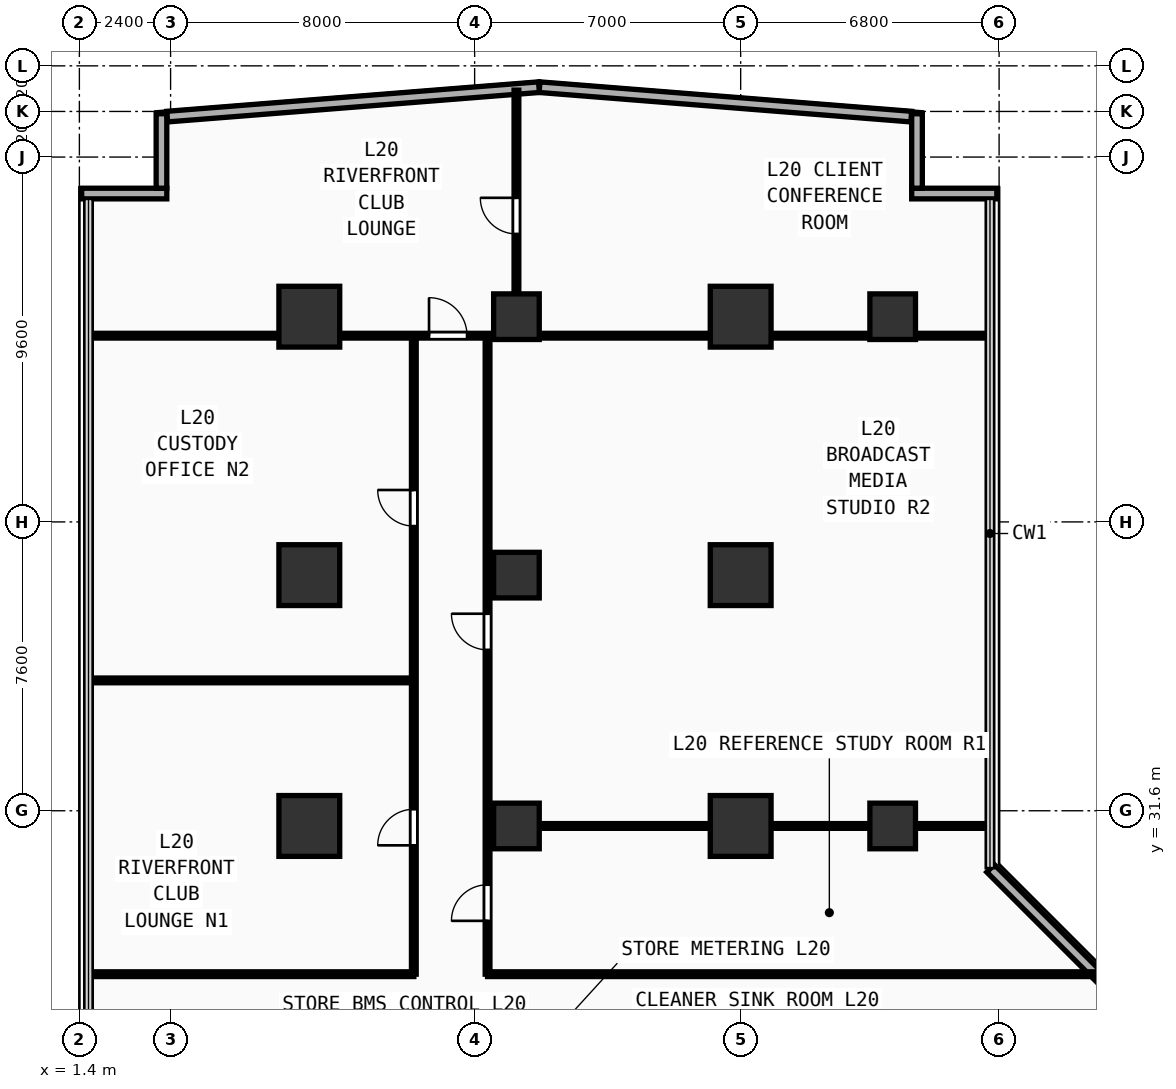
"""IFC4 building model, lengths in metres.
Left out: names, types, materials, properties, quantities, classifications, styles, units other than length and angle.
Written with IfcOpenShell. Run it as: python <this file> out.ifc"""

import sys

from ifc_helpers import new_model, si_unit, direction, frame, frame_2d, origin, origin_2d, place, context, subcontext, project, spatial, rectangle, extrude, element, fill, save


model = new_model("IFC4")
c1 = context("Model", 3, precision=1e-05, world=origin(), true_north=direction((0.0, 1.0)))
c2 = subcontext(c1, "Body", "Model", "MODEL_VIEW")
j1 = project(units=[si_unit("LENGTHUNIT", "METRE"), si_unit("PLANEANGLEUNIT", "RADIAN")], contexts=[c1])
p1 = place(None, origin())
s1 = spatial("IfcSite", under=j1, at=p1, CompositionType="ELEMENT")
p2 = place(p1, origin())
s2 = spatial("IfcBuilding", under=s1, at=p2, CompositionType="ELEMENT")
p3 = place(p2, frame((0.0, 0.0, 79.0)))
s3 = spatial("IfcBuildingStorey", under=s2, at=p3, CompositionType="ELEMENT", Elevation=79.0)
for number, where, z_axis, x_axis in (
    (1, (7.45, 31.2, 0.0), (0.0, 0.0, 1.0), (1.0, 0.0, 0.0)),
    (2, (7.45, 37.8, 0.0), (0.0, 0.0, 1.0), (1.0, 0.0, 0.0)),
    (3, (7.45, 44.6, 0.0), (0.0, 0.0, 1.0), (1.0, 0.0, 0.0)),
    (4, (18.8, 31.2, 0.0), (0.0, 0.0, 1.0), (1.0, 0.0, 0.0)),
    (5, (18.8, 37.8, 0.0), (0.0, 0.0, 1.0), (1.0, 0.0, 0.0)),
    (6, (18.8, 44.6, 0.0), (0.0, 0.0, 1.0), (1.0, 0.0, 0.0)),
):
    element("IfcColumn", number, at=place(p3, frame(where, z_axis=z_axis, x_axis=x_axis)), inside=s3, PredefinedType="COLUMN", context=c2, shape_type="SweptSolid", body=[
        extrude(rectangle(XDim=1.6, YDim=1.6, at=origin_2d()), origin(), (0.0, 0.0, 1.0), 3.42),
    ])
for number, where, z_axis, x_axis in (
    (7, (22.8, 31.2, 0.0), (0.0, 0.0, 1.0), (1.0, 0.0, 0.0)),
    (8, (22.8, 44.6, 0.0), (0.0, 0.0, 1.0), (1.0, 0.0, 0.0)),
    (9, (12.9, 31.2, 0.0), (0.0, 0.0, 1.0), (1.0, 0.0, 0.0)),
    (10, (12.9, 37.8, 0.0), (0.0, 0.0, 1.0), (1.0, 0.0, 0.0)),
    (11, (12.9, 44.6, 0.0), (0.0, 0.0, 1.0), (1.0, 0.0, 0.0)),
):
    element("IfcColumn", number, at=place(p3, frame(where, z_axis=z_axis, x_axis=x_axis)), inside=s3, PredefinedType="COLUMN", context=c2, shape_type="SweptSolid", body=[
        extrude(rectangle(XDim=1.2, YDim=1.2, at=origin_2d()), origin(), (0.0, 0.0, 1.0), 3.42),
    ])
p4 = place(p3, frame((23.3, 47.84, 0.0), z_axis=(0.0, 0.0, 1.0), x_axis=(1.0, 0.0, 0.0)))
e12 = element("IfcWall", 12, at=p4, inside=s3, PredefinedType="SOLIDWALL", context=c2, shape_type="SweptSolid", body=[
    extrude(rectangle(XDim=2.24, YDim=0.28, at=frame_2d((1.12, 0.0))), origin(), (0.0, 0.0, 1.0), 3.42),
])
p5 = place(p3, frame((23.44, 47.98, 0.0), z_axis=(0.0, 0.0, 1.0), x_axis=(0.0, 1.0, 0.0)))
e13 = element("IfcWall", 13, at=p5, inside=s3, PredefinedType="SOLIDWALL", context=c2, shape_type="SweptSolid", body=[
    extrude(rectangle(XDim=1.96, YDim=0.28, at=frame_2d((0.98, 0.0))), origin(), (0.0, 0.0, 1.0), 3.42),
])
p6 = place(p3, frame((1.46, 47.84, 0.0), z_axis=(0.0, 0.0, 1.0), x_axis=(1.0, 0.0, 0.0)))
e14 = element("IfcWall", 14, at=p6, inside=s3, PredefinedType="SOLIDWALL", context=c2, shape_type="SweptSolid", body=[
    extrude(rectangle(XDim=2.24, YDim=0.28, at=frame_2d((1.12, 0.0))), origin(), (0.0, 0.0, 1.0), 3.42),
])
p7 = place(p3, frame((3.56, 47.98, 0.0), z_axis=(0.0, 0.0, 1.0), x_axis=(0.0, 1.0, 0.0)))
e15 = element("IfcWall", 15, at=p7, inside=s3, PredefinedType="SOLIDWALL", context=c2, shape_type="SweptSolid", body=[
    extrude(rectangle(XDim=1.96, YDim=0.28, at=frame_2d((0.98, 0.0))), origin(), (0.0, 0.0, 1.0), 3.42),
])
p8 = place(p3, frame((31.885, 23.575, 0.0), z_axis=(0.0, 0.0, 1.0), x_axis=(-0.707106781187, 0.707106781187, 0.0)))
e16 = element("IfcWall", 16, at=p8, inside=s3, PredefinedType="SOLIDWALL", context=c2, shape_type="SweptSolid", body=[
    extrude(rectangle(XDim=9.207, YDim=0.28, at=frame_2d((4.603, 0.0))), origin(), (0.0, 0.0, 1.0), 3.42),
])
for number, where, z_axis, x_axis in (
    (17, (23.288, 49.864, 0.0), (0.0, 0.0, 1.0), (-0.997, 0.079, 0.0)),
    (18, (13.493, 50.639, 0.0), (0.0, 0.0, 1.0), (-0.997, -0.079, 0.0)),
):
    element("IfcWall", number, at=place(p3, frame(where, z_axis=z_axis, x_axis=x_axis)), inside=s3, PredefinedType="SOLIDWALL", context=c2, shape_type="SweptSolid", body=[
        extrude(rectangle(XDim=9.812, YDim=0.28, at=frame_2d((4.906, 0.0))), origin(), (0.0, 0.0, 1.0), 3.42),
    ])
p9 = place(p3, frame((1.64, 27.3, 0.0), z_axis=(0.0, 0.0, 1.0), x_axis=(1.0, 0.0, 0.0)))
e19 = element("IfcWall", 19, at=p9, inside=s3, PredefinedType="PARTITIONING", context=c2, shape_type="SweptSolid", body=[
    extrude(rectangle(XDim=8.56, YDim=0.125, at=frame_2d((4.28, 0.0))), origin(), (0.0, 0.0, 1.0), 3.42),
])
p10 = place(p3, frame((10.2, 27.3, 0.0), z_axis=(0.0, 0.0, 1.0), x_axis=(0.0, 1.0, 0.0)))
e20 = element("IfcWall", 20, at=p10, inside=s3, PredefinedType="PARTITIONING", context=c2, shape_type="SweptSolid", body=[
    extrude(rectangle(XDim=16.8, YDim=0.125, at=frame_2d((8.4, 0.0))), origin(), (0.0, 0.0, 1.0), 3.42),
])
p11 = place(p10, frame((3.39, 0.0, 0.0)))
e21 = element("IfcOpeningElement", 21, at=p11, cuts=e20, PredefinedType="OPENING", context=c2, shape_type="SweptSolid", body=[
    extrude(rectangle(XDim=0.95, YDim=2.15, at=frame_2d((0.475, 1.075))), frame((0.0, 0.073, 0.0), z_axis=(0.0, -1.0, 0.0), x_axis=(1.0, 0.0, 0.0)), (0.0, 0.0, 1.0), 0.145),
])
p12 = place(p10, frame((11.79, 0.0, 0.0)))
e22 = element("IfcOpeningElement", 22, at=p12, cuts=e20, PredefinedType="OPENING", context=c2, shape_type="SweptSolid", body=[
    extrude(rectangle(XDim=0.95, YDim=2.15, at=frame_2d((0.475, 1.075))), frame((0.0, 0.073, 0.0), z_axis=(0.0, -1.0, 0.0), x_axis=(1.0, 0.0, 0.0)), (0.0, 0.0, 1.0), 0.145),
])
p13 = place(p3, frame((1.64, 35.03, 0.0), z_axis=(0.0, 0.0, 1.0), x_axis=(1.0, 0.0, 0.0)))
e23 = element("IfcWall", 23, at=p13, inside=s3, PredefinedType="PARTITIONING", context=c2, shape_type="SweptSolid", body=[
    extrude(rectangle(XDim=8.56, YDim=0.125, at=frame_2d((4.28, 0.0))), origin(), (0.0, 0.0, 1.0), 3.42),
])
p14 = place(p3, frame((1.64, 44.1, 0.0), z_axis=(0.0, 0.0, 1.0), x_axis=(1.0, 0.0, 0.0)))
e24 = element("IfcWall", 24, at=p14, inside=s3, PredefinedType="PARTITIONING", context=c2, shape_type="SweptSolid", body=[
    extrude(rectangle(XDim=23.72, YDim=0.125, at=frame_2d((11.86, 0.0))), origin(), (0.0, 0.0, 1.0), 3.42),
])
p15 = place(p14, frame((8.96, 0.0, 0.0)))
e25 = element("IfcOpeningElement", 25, at=p15, cuts=e24, PredefinedType="OPENING", context=c2, shape_type="SweptSolid", body=[
    extrude(rectangle(XDim=1.0, YDim=2.2, at=frame_2d((0.5, 1.1))), frame((0.0, 0.073, 0.0), z_axis=(0.0, -1.0, 0.0), x_axis=(1.0, 0.0, 0.0)), (0.0, 0.0, 1.0), 0.145),
])
p16 = place(p3, frame((12.9, 44.1, 0.0), z_axis=(0.0, 0.0, 1.0), x_axis=(0.0, 1.0, 0.0)))
e26 = element("IfcWall", 26, at=p16, inside=s3, PredefinedType="PARTITIONING", context=c2, shape_type="SweptSolid", body=[
    extrude(rectangle(XDim=6.46, YDim=0.125, at=frame_2d((3.23, 0.0))), origin(), (0.0, 0.0, 1.0), 2.82),
])
p17 = place(p16, frame((2.677, 0.0, 0.0)))
e27 = element("IfcOpeningElement", 27, at=p17, cuts=e26, PredefinedType="OPENING", context=c2, shape_type="SweptSolid", body=[
    extrude(rectangle(XDim=0.95, YDim=2.15, at=frame_2d((0.475, 1.075))), frame((0.0, 0.073, 0.0), z_axis=(0.0, -1.0, 0.0), x_axis=(1.0, 0.0, 0.0)), (0.0, 0.0, 1.0), 0.145),
])
p18 = place(p3, frame((12.14, 27.3, 0.0), z_axis=(0.0, 0.0, 1.0), x_axis=(1.0, 0.0, 0.0)))
e28 = element("IfcWall", 28, at=p18, inside=s3, PredefinedType="PARTITIONING", context=c2, shape_type="SweptSolid", body=[
    extrude(rectangle(XDim=16.12, YDim=0.125, at=frame_2d((8.06, 0.0))), origin(), (0.0, 0.0, 1.0), 3.42),
])
p19 = place(p3, frame((12.14, 27.3, 0.0), z_axis=(0.0, 0.0, 1.0), x_axis=(0.0, 1.0, 0.0)))
e29 = element("IfcWall", 29, at=p19, inside=s3, PredefinedType="PARTITIONING", context=c2, shape_type="SweptSolid", body=[
    extrude(rectangle(XDim=16.8, YDim=0.125, at=frame_2d((8.4, 0.0))), origin(), (0.0, 0.0, 1.0), 3.42),
])
p20 = place(p19, frame((1.403, 0.0, 0.0)))
e30 = element("IfcOpeningElement", 30, at=p20, cuts=e29, PredefinedType="OPENING", context=c2, shape_type="SweptSolid", body=[
    extrude(rectangle(XDim=0.95, YDim=2.15, at=frame_2d((0.475, 1.075))), frame((0.0, 0.073, 0.0), z_axis=(0.0, -1.0, 0.0), x_axis=(1.0, 0.0, 0.0)), (0.0, 0.0, 1.0), 0.145),
])
p21 = place(p19, frame((8.534, 0.0, 0.0)))
e31 = element("IfcOpeningElement", 31, at=p21, cuts=e29, PredefinedType="OPENING", context=c2, shape_type="SweptSolid", body=[
    extrude(rectangle(XDim=0.95, YDim=2.15, at=frame_2d((0.475, 1.075))), frame((0.0, 0.073, 0.0), z_axis=(0.0, -1.0, 0.0), x_axis=(1.0, 0.0, 0.0)), (0.0, 0.0, 1.0), 0.145),
])
p22 = place(p3, frame((12.14, 31.2, 0.0), z_axis=(0.0, 0.0, 1.0), x_axis=(1.0, 0.0, 0.0)))
e32 = element("IfcWall", 32, at=p22, inside=s3, PredefinedType="PARTITIONING", context=c2, shape_type="SweptSolid", body=[
    extrude(rectangle(XDim=13.22, YDim=0.125, at=frame_2d((6.61, 0.0))), origin(), (0.0, 0.0, 1.0), 2.82),
])
p23 = place(p11, origin())
e33 = element("IfcDoor", 33, at=p23, inside=s3, OperationType="SINGLE_SWING_LEFT", PredefinedType="DOOR", context=c2, shape_type="SweptSolid", body=[
    extrude(rectangle(XDim=0.95, YDim=2.15, at=frame_2d((0.475, 1.075))), frame((0.0, 0.025, 0.0), z_axis=(0.0, -1.0, 0.0), x_axis=(1.0, 0.0, 0.0)), (0.0, 0.0, 1.0), 0.05),
])
fill(e21, e33)
p24 = place(p12, origin())
e34 = element("IfcDoor", 34, at=p24, inside=s3, OperationType="SINGLE_SWING_RIGHT", PredefinedType="DOOR", context=c2, shape_type="SweptSolid", body=[
    extrude(rectangle(XDim=0.95, YDim=2.15, at=frame_2d((0.475, 1.075))), frame((0.0, 0.025, 0.0), z_axis=(0.0, -1.0, 0.0), x_axis=(1.0, 0.0, 0.0)), (0.0, 0.0, 1.0), 0.05),
])
fill(e22, e34)
p25 = place(p15, origin())
e35 = element("IfcDoor", 35, at=p25, inside=s3, OperationType="SINGLE_SWING_LEFT", PredefinedType="DOOR", context=c2, shape_type="SweptSolid", body=[
    extrude(rectangle(XDim=1.0, YDim=2.2, at=frame_2d((0.5, 1.1))), frame((0.0, 0.025, 0.0), z_axis=(0.0, -1.0, 0.0), x_axis=(1.0, 0.0, 0.0)), (0.0, 0.0, 1.0), 0.05),
])
fill(e25, e35)
p26 = place(p17, origin())
e36 = element("IfcDoor", 36, at=p26, inside=s3, OperationType="SINGLE_SWING_RIGHT", PredefinedType="DOOR", context=c2, shape_type="SweptSolid", body=[
    extrude(rectangle(XDim=0.95, YDim=2.15, at=frame_2d((0.475, 1.075))), frame((0.0, 0.025, 0.0), z_axis=(0.0, -1.0, 0.0), x_axis=(1.0, 0.0, 0.0)), (0.0, 0.0, 1.0), 0.05),
])
fill(e27, e36)
p27 = place(p20, origin())
e37 = element("IfcDoor", 37, at=p27, inside=s3, OperationType="SINGLE_SWING_LEFT", PredefinedType="DOOR", context=c2, shape_type="SweptSolid", body=[
    extrude(rectangle(XDim=0.95, YDim=2.15, at=frame_2d((0.475, 1.075))), frame((0.0, 0.025, 0.0), z_axis=(0.0, -1.0, 0.0), x_axis=(1.0, 0.0, 0.0)), (0.0, 0.0, 1.0), 0.05),
])
fill(e30, e37)
p28 = place(p21, origin())
e38 = element("IfcDoor", 38, at=p28, inside=s3, OperationType="SINGLE_SWING_RIGHT", PredefinedType="DOOR", context=c2, shape_type="SweptSolid", body=[
    extrude(rectangle(XDim=0.95, YDim=2.15, at=frame_2d((0.475, 1.075))), frame((0.0, 0.025, 0.0), z_axis=(0.0, -1.0, 0.0), x_axis=(1.0, 0.0, 0.0)), (0.0, 0.0, 1.0), 0.05),
])
fill(e31, e38)
save(model, sys.argv[1])
